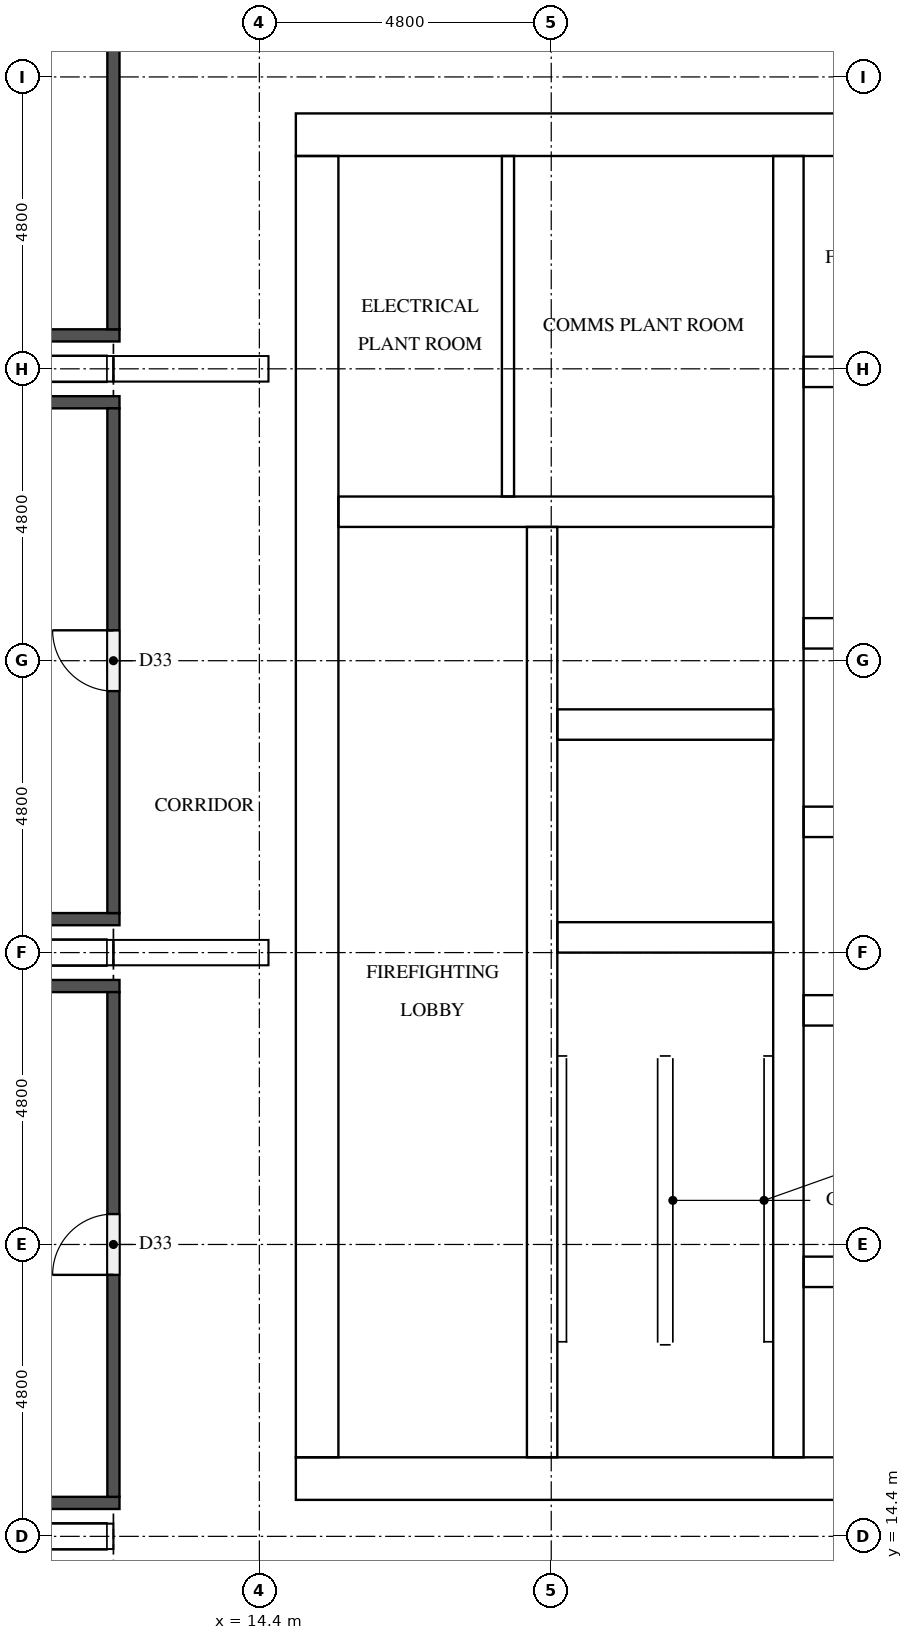
"""IFC4 building model, lengths in metres.
Left out: names, types, materials, properties, quantities, classifications, styles, units other than length and angle.
Written with IfcOpenShell. Run it as: python <this file> out.ifc"""

import sys

from ifc_helpers import new_model, si_unit, direction, frame, frame_2d, origin, place, context, subcontext, project, spatial, rectangle, extrude, element, fill, save


model = new_model("IFC4")
c1 = context("Model", 3, precision=1e-05, world=origin(), true_north=direction((0.0, 1.0)))
c2 = subcontext(c1, "Body", "Model", "MODEL_VIEW")
j1 = project(units=[si_unit("LENGTHUNIT", "METRE"), si_unit("PLANEANGLEUNIT", "RADIAN")], contexts=[c1])
p1 = place(None, origin())
s1 = spatial("IfcSite", under=j1, at=p1, CompositionType="ELEMENT")
p2 = place(p1, origin())
s2 = spatial("IfcBuilding", under=s1, at=p2, CompositionType="ELEMENT")
p3 = place(p2, frame((0.0, 0.0, 173.5)))
s3 = spatial("IfcBuildingStorey", under=s2, at=p3, CompositionType="ELEMENT", Elevation=173.5)
p4 = place(p3, frame((15.0, 15.35, 0.0), z_axis=(0.0, 0.0, 1.0), x_axis=(1.0, 0.0, 0.0)))
e1 = element("IfcWall", 1, at=p4, inside=s3, PredefinedType="SHEAR", context=c2, shape_type="SweptSolid", body=[
    extrude(rectangle(XDim=32.4, YDim=0.7, at=frame_2d((16.2, 0.0))), origin(), (0.0, 0.0, 1.0), 5.1),
])
p5 = place(p4, frame((15.3, 0.0, 0.0)))
e2 = element("IfcOpeningElement", 2, at=p5, cuts=e1, PredefinedType="OPENING", context=c2, shape_type="SweptSolid", body=[
    extrude(rectangle(XDim=1.8, YDim=2.1, at=frame_2d((0.9, 1.05))), frame((0.0, 0.36, 0.0), z_axis=(0.0, -1.0, 0.0), x_axis=(1.0, 0.0, 0.0)), (0.0, 0.0, 1.0), 0.72),
])
p6 = place(p3, frame((15.0, 37.45, 0.0), z_axis=(0.0, 0.0, 1.0), x_axis=(1.0, 0.0, 0.0)))
e3 = element("IfcWall", 3, at=p6, inside=s3, PredefinedType="SHEAR", context=c2, shape_type="SweptSolid", body=[
    extrude(rectangle(XDim=32.4, YDim=0.7, at=frame_2d((16.2, 0.0))), origin(), (0.0, 0.0, 1.0), 5.1),
])
p7 = place(p6, frame((15.3, 0.0, 0.0)))
e4 = element("IfcOpeningElement", 4, at=p7, cuts=e3, PredefinedType="OPENING", context=c2, shape_type="SweptSolid", body=[
    extrude(rectangle(XDim=1.8, YDim=2.1, at=frame_2d((0.9, 1.05))), frame((0.0, 0.36, 0.0), z_axis=(0.0, -1.0, 0.0), x_axis=(1.0, 0.0, 0.0)), (0.0, 0.0, 1.0), 0.72),
])
p8 = place(p6, frame((1.544, 0.0, 0.0)))
e5 = element("IfcOpeningElement", 5, at=p8, cuts=e3, PredefinedType="OPENING", context=c2, shape_type="SweptSolid", body=[
    extrude(rectangle(XDim=1.0, YDim=2.1, at=frame_2d((0.5, 1.05))), frame((0.0, 0.36, 0.0), z_axis=(0.0, -1.0, 0.0), x_axis=(1.0, 0.0, 0.0)), (0.0, 0.0, 1.0), 0.72),
])
p9 = place(p6, frame((5.219, 0.0, 0.0)))
e6 = element("IfcOpeningElement", 6, at=p9, cuts=e3, PredefinedType="OPENING", context=c2, shape_type="SweptSolid", body=[
    extrude(rectangle(XDim=1.0, YDim=2.1, at=frame_2d((0.5, 1.05))), frame((0.0, 0.36, 0.0), z_axis=(0.0, -1.0, 0.0), x_axis=(1.0, 0.0, 0.0)), (0.0, 0.0, 1.0), 0.72),
])
p10 = place(p3, frame((15.35, 15.7, 0.0), z_axis=(0.0, 0.0, 1.0), x_axis=(0.0, 1.0, 0.0)))
e7 = element("IfcWall", 7, at=p10, inside=s3, PredefinedType="SHEAR", context=c2, shape_type="SweptSolid", body=[
    extrude(rectangle(XDim=21.4, YDim=0.7, at=frame_2d((10.7, 0.0))), origin(), (0.0, 0.0, 1.0), 5.1),
])
p11 = place(p10, frame((5.06, 0.0, 0.0)))
e8 = element("IfcOpeningElement", 8, at=p11, cuts=e7, PredefinedType="OPENING", context=c2, shape_type="SweptSolid", body=[
    extrude(rectangle(XDim=1.2, YDim=2.1, at=frame_2d((0.6, 1.05))), frame((0.0, 0.36, 0.0), z_axis=(0.0, -1.0, 0.0), x_axis=(1.0, 0.0, 0.0)), (0.0, 0.0, 1.0), 0.72),
])
p12 = place(p3, frame((19.05, 15.7, 0.0), z_axis=(0.0, 0.0, 1.0), x_axis=(0.0, 1.0, 0.0)))
e9 = element("IfcWall", 9, at=p12, inside=s3, PredefinedType="SHEAR", context=c2, shape_type="SweptSolid", body=[
    extrude(rectangle(XDim=15.3, YDim=0.5, at=frame_2d((7.65, 0.0))), origin(), (0.0, 0.0, 1.0), 5.1),
])
p13 = place(p12, frame((9.75, 0.0, 0.0)))
e10 = element("IfcOpeningElement", 10, at=p13, cuts=e9, PredefinedType="OPENING", context=c2, shape_type="SweptSolid", body=[
    extrude(rectangle(XDim=1.1, YDim=2.1, at=frame_2d((0.55, 1.05))), frame((0.0, 0.26, 0.0), z_axis=(0.0, -1.0, 0.0), x_axis=(1.0, 0.0, 0.0)), (0.0, 0.0, 1.0), 0.52),
])
p14 = place(p12, frame((13.25, 0.0, 0.0)))
e11 = element("IfcOpeningElement", 11, at=p14, cuts=e9, PredefinedType="OPENING", context=c2, shape_type="SweptSolid", body=[
    extrude(rectangle(XDim=1.1, YDim=2.1, at=frame_2d((0.55, 1.05))), frame((0.0, 0.26, 0.0), z_axis=(0.0, -1.0, 0.0), x_axis=(1.0, 0.0, 0.0)), (0.0, 0.0, 1.0), 0.52),
])
p15 = place(p12, frame((0.5, 0.0, 0.0)))
e12 = element("IfcOpeningElement", 12, at=p15, cuts=e9, PredefinedType="OPENING", context=c2, shape_type="SweptSolid", body=[
    extrude(rectangle(XDim=1.2, YDim=2.1, at=frame_2d((0.6, 1.05))), frame((0.0, 0.26, 0.0), z_axis=(0.0, -1.0, 0.0), x_axis=(1.0, 0.0, 0.0)), (0.0, 0.0, 1.0), 0.52),
])
p16 = place(p3, frame((23.1, 15.7, 0.0), z_axis=(0.0, 0.0, 1.0), x_axis=(0.0, 1.0, 0.0)))
e13 = element("IfcWall", 13, at=p16, inside=s3, PredefinedType="SHEAR", context=c2, shape_type="SweptSolid", body=[
    extrude(rectangle(XDim=21.4, YDim=0.5, at=frame_2d((10.7, 0.0))), origin(), (0.0, 0.0, 1.0), 5.1),
])
for number, where, z_axis, x_axis in (
    (14, (19.3, 24.25, 0.0), (0.0, 0.0, 1.0), (1.0, 0.0, 0.0)),
    (15, (19.3, 27.75, 0.0), (0.0, 0.0, 1.0), (1.0, 0.0, 0.0)),
):
    element("IfcWall", number, at=place(p3, frame(where, z_axis=z_axis, x_axis=x_axis)), inside=s3, PredefinedType="SHEAR", context=c2, shape_type="SweptSolid", body=[
        extrude(rectangle(XDim=3.55, YDim=0.5, at=frame_2d((1.775, 0.0))), origin(), (0.0, 0.0, 1.0), 5.1),
    ])
p17 = place(p3, frame((15.7, 31.25, 0.0), z_axis=(0.0, 0.0, 1.0), x_axis=(1.0, 0.0, 0.0)))
e16 = element("IfcWall", 16, at=p17, inside=s3, PredefinedType="SHEAR", context=c2, shape_type="SweptSolid", body=[
    extrude(rectangle(XDim=7.15, YDim=0.5, at=frame_2d((3.575, 0.0))), origin(), (0.0, 0.0, 1.0), 5.1),
])
p18 = place(p3, frame((23.35, 18.75, 0.0), z_axis=(0.0, 0.0, 1.0), x_axis=(1.0, 0.0, 0.0)))
e17 = element("IfcWall", 17, at=p18, inside=s3, PredefinedType="SHEAR", context=c2, shape_type="SweptSolid", body=[
    extrude(rectangle(XDim=5.6, YDim=0.5, at=frame_2d((2.8, 0.0))), origin(), (0.0, 0.0, 1.0), 5.1),
])
p19 = place(p18, frame((2.05, 0.0, 0.0)))
e18 = element("IfcOpeningElement", 18, at=p19, cuts=e17, PredefinedType="OPENING", context=c2, shape_type="SweptSolid", body=[
    extrude(rectangle(XDim=1.0, YDim=2.1, at=frame_2d((0.5, 1.05))), frame((0.0, 0.26, 0.0), z_axis=(0.0, -1.0, 0.0), x_axis=(1.0, 0.0, 0.0)), (0.0, 0.0, 1.0), 0.52),
])
p20 = place(p3, frame((23.35, 23.05, 0.0), z_axis=(0.0, 0.0, 1.0), x_axis=(1.0, 0.0, 0.0)))
e19 = element("IfcWall", 19, at=p20, inside=s3, PredefinedType="SHEAR", context=c2, shape_type="SweptSolid", body=[
    extrude(rectangle(XDim=15.7, YDim=0.5, at=frame_2d((7.85, 0.0))), origin(), (0.0, 0.0, 1.0), 5.1),
])
p21 = place(p20, frame((2.05, 0.0, 0.0)))
e20 = element("IfcOpeningElement", 20, at=p21, cuts=e19, PredefinedType="OPENING", context=c2, shape_type="SweptSolid", body=[
    extrude(rectangle(XDim=1.0, YDim=2.1, at=frame_2d((0.5, 1.05))), frame((0.0, 0.26, 0.0), z_axis=(0.0, -1.0, 0.0), x_axis=(1.0, 0.0, 0.0)), (0.0, 0.0, 1.0), 0.52),
])
p22 = place(p20, frame((12.65, 0.0, 0.0)))
e21 = element("IfcOpeningElement", 21, at=p22, cuts=e19, PredefinedType="OPENING", context=c2, shape_type="SweptSolid", body=[
    extrude(rectangle(XDim=1.0, YDim=2.1, at=frame_2d((0.5, 1.05))), frame((0.0, 0.26, 0.0), z_axis=(0.0, -1.0, 0.0), x_axis=(1.0, 0.0, 0.0)), (0.0, 0.0, 1.0), 0.52),
])
p23 = place(p3, frame((23.35, 26.15, 0.0), z_axis=(0.0, 0.0, 1.0), x_axis=(1.0, 0.0, 0.0)))
e22 = element("IfcWall", 22, at=p23, inside=s3, PredefinedType="SHEAR", context=c2, shape_type="SweptSolid", body=[
    extrude(rectangle(XDim=15.7, YDim=0.5, at=frame_2d((7.85, 0.0))), origin(), (0.0, 0.0, 1.0), 5.1),
])
p24 = place(p3, frame((23.35, 29.25, 0.0), z_axis=(0.0, 0.0, 1.0), x_axis=(1.0, 0.0, 0.0)))
e23 = element("IfcWall", 23, at=p24, inside=s3, PredefinedType="SHEAR", context=c2, shape_type="SweptSolid", body=[
    extrude(rectangle(XDim=15.7, YDim=0.5, at=frame_2d((7.85, 0.0))), origin(), (0.0, 0.0, 1.0), 5.1),
])
p25 = place(p24, frame((0.675, 0.0, 0.0)))
e24 = element("IfcOpeningElement", 24, at=p25, cuts=e23, PredefinedType="OPENING", context=c2, shape_type="SweptSolid", body=[
    extrude(rectangle(XDim=1.1, YDim=2.1, at=frame_2d((0.55, 1.05))), frame((0.0, 0.26, 0.0), z_axis=(0.0, -1.0, 0.0), x_axis=(1.0, 0.0, 0.0)), (0.0, 0.0, 1.0), 0.52),
])
p26 = place(p24, frame((3.325, 0.0, 0.0)))
e25 = element("IfcOpeningElement", 25, at=p26, cuts=e23, PredefinedType="OPENING", context=c2, shape_type="SweptSolid", body=[
    extrude(rectangle(XDim=1.1, YDim=2.1, at=frame_2d((0.55, 1.05))), frame((0.0, 0.26, 0.0), z_axis=(0.0, -1.0, 0.0), x_axis=(1.0, 0.0, 0.0)), (0.0, 0.0, 1.0), 0.52),
])
p27 = place(p24, frame((5.975, 0.0, 0.0)))
e26 = element("IfcOpeningElement", 26, at=p27, cuts=e23, PredefinedType="OPENING", context=c2, shape_type="SweptSolid", body=[
    extrude(rectangle(XDim=1.1, YDim=2.1, at=frame_2d((0.55, 1.05))), frame((0.0, 0.26, 0.0), z_axis=(0.0, -1.0, 0.0), x_axis=(1.0, 0.0, 0.0)), (0.0, 0.0, 1.0), 0.52),
])
p28 = place(p24, frame((8.625, 0.0, 0.0)))
e27 = element("IfcOpeningElement", 27, at=p28, cuts=e23, PredefinedType="OPENING", context=c2, shape_type="SweptSolid", body=[
    extrude(rectangle(XDim=1.1, YDim=2.1, at=frame_2d((0.55, 1.05))), frame((0.0, 0.26, 0.0), z_axis=(0.0, -1.0, 0.0), x_axis=(1.0, 0.0, 0.0)), (0.0, 0.0, 1.0), 0.52),
])
p29 = place(p24, frame((11.275, 0.0, 0.0)))
e28 = element("IfcOpeningElement", 28, at=p29, cuts=e23, PredefinedType="OPENING", context=c2, shape_type="SweptSolid", body=[
    extrude(rectangle(XDim=1.1, YDim=2.1, at=frame_2d((0.55, 1.05))), frame((0.0, 0.26, 0.0), z_axis=(0.0, -1.0, 0.0), x_axis=(1.0, 0.0, 0.0)), (0.0, 0.0, 1.0), 0.52),
])
p30 = place(p24, frame((13.925, 0.0, 0.0)))
e29 = element("IfcOpeningElement", 29, at=p30, cuts=e23, PredefinedType="OPENING", context=c2, shape_type="SweptSolid", body=[
    extrude(rectangle(XDim=1.1, YDim=2.1, at=frame_2d((0.55, 1.05))), frame((0.0, 0.26, 0.0), z_axis=(0.0, -1.0, 0.0), x_axis=(1.0, 0.0, 0.0)), (0.0, 0.0, 1.0), 0.52),
])
p31 = place(p3, frame((23.35, 33.55, 0.0), z_axis=(0.0, 0.0, 1.0), x_axis=(1.0, 0.0, 0.0)))
e30 = element("IfcWall", 30, at=p31, inside=s3, PredefinedType="SHEAR", context=c2, shape_type="SweptSolid", body=[
    extrude(rectangle(XDim=5.6, YDim=0.5, at=frame_2d((2.8, 0.0))), origin(), (0.0, 0.0, 1.0), 5.1),
])
p32 = place(p31, frame((2.05, 0.0, 0.0)))
e31 = element("IfcOpeningElement", 31, at=p32, cuts=e30, PredefinedType="OPENING", context=c2, shape_type="SweptSolid", body=[
    extrude(rectangle(XDim=1.0, YDim=2.1, at=frame_2d((0.5, 1.05))), frame((0.0, 0.26, 0.0), z_axis=(0.0, -1.0, 0.0), x_axis=(1.0, 0.0, 0.0)), (0.0, 0.0, 1.0), 0.52),
])
p33 = place(p3, frame((18.489, 31.5, 0.0), z_axis=(0.0, 0.0, 1.0), x_axis=(0.0, 1.0, 0.0)))
e32 = element("IfcWall", 32, at=p33, inside=s3, PredefinedType="PARTITIONING", context=c2, shape_type="SweptSolid", body=[
    extrude(rectangle(XDim=5.6, YDim=0.2, at=frame_2d((2.8, 0.0))), origin(), (0.0, 0.0, 1.0), 5.1),
])
for number, where, z_axis, x_axis in (
    (33, (7.1, 14.95, 0.0), (0.0, 0.0, 1.0), (1.0, 0.0, 0.0)),
    (34, (7.1, 23.45, 0.0), (0.0, 0.0, 1.0), (1.0, 0.0, 0.0)),
    (35, (7.1, 24.55, 0.0), (0.0, 0.0, 1.0), (1.0, 0.0, 0.0)),
    (36, (7.1, 33.05, 0.0), (0.0, 0.0, 1.0), (1.0, 0.0, 0.0)),
    (37, (7.1, 34.15, 0.0), (0.0, 0.0, 1.0), (1.0, 0.0, 0.0)),
):
    element("IfcWall", number, at=place(p3, frame(where, z_axis=z_axis, x_axis=x_axis)), inside=s3, PredefinedType="PARTITIONING", context=c2, shape_type="SweptSolid", body=[
        extrude(rectangle(XDim=5.0, YDim=0.2, at=frame_2d((2.5, 0.0))), origin(), (0.0, 0.0, 1.0), 5.1),
    ])
p34 = place(p3, frame((12.0, 15.05, 0.0), z_axis=(0.0, 0.0, 1.0), x_axis=(0.0, 1.0, 0.0)))
e38 = element("IfcWall", 38, at=p34, inside=s3, PredefinedType="PARTITIONING", context=c2, shape_type="SweptSolid", body=[
    extrude(rectangle(XDim=8.3, YDim=0.2, at=frame_2d((4.15, 0.0))), origin(), (0.0, 0.0, 1.0), 5.1),
])
p35 = place(p34, frame((3.65, 0.0, 0.0)))
e39 = element("IfcOpeningElement", 39, at=p35, cuts=e38, PredefinedType="OPENING", context=c2, shape_type="SweptSolid", body=[
    extrude(rectangle(XDim=1.0, YDim=2.1, at=frame_2d((0.5, 1.05))), frame((0.0, 0.11, 0.0), z_axis=(0.0, -1.0, 0.0), x_axis=(1.0, 0.0, 0.0)), (0.0, 0.0, 1.0), 0.22),
])
p36 = place(p3, frame((12.0, 24.65, 0.0), z_axis=(0.0, 0.0, 1.0), x_axis=(0.0, 1.0, 0.0)))
e40 = element("IfcWall", 40, at=p36, inside=s3, PredefinedType="PARTITIONING", context=c2, shape_type="SweptSolid", body=[
    extrude(rectangle(XDim=8.3, YDim=0.2, at=frame_2d((4.15, 0.0))), origin(), (0.0, 0.0, 1.0), 5.1),
])
p37 = place(p36, frame((3.65, 0.0, 0.0)))
e41 = element("IfcOpeningElement", 41, at=p37, cuts=e40, PredefinedType="OPENING", context=c2, shape_type="SweptSolid", body=[
    extrude(rectangle(XDim=1.0, YDim=2.1, at=frame_2d((0.5, 1.05))), frame((0.0, 0.11, 0.0), z_axis=(0.0, -1.0, 0.0), x_axis=(1.0, 0.0, 0.0)), (0.0, 0.0, 1.0), 0.22),
])
p38 = place(p3, frame((12.0, 34.25, 0.0), z_axis=(0.0, 0.0, 1.0), x_axis=(0.0, 1.0, 0.0)))
e42 = element("IfcWall", 42, at=p38, inside=s3, PredefinedType="PARTITIONING", context=c2, shape_type="SweptSolid", body=[
    extrude(rectangle(XDim=6.45, YDim=0.2, at=frame_2d((3.225, 0.0))), origin(), (0.0, 0.0, 1.0), 5.1),
])
p39 = place(p13, origin())
e43 = element("IfcDoor", 43, at=p39, inside=s3, OperationType="DOUBLE_DOOR_SLIDING", PredefinedType="DOOR", context=c2, shape_type="SweptSolid", body=[
    extrude(rectangle(XDim=1.1, YDim=2.1, at=frame_2d((0.55, 1.05))), frame((0.0, 0.025, 0.0), z_axis=(0.0, -1.0, 0.0), x_axis=(1.0, 0.0, 0.0)), (0.0, 0.0, 1.0), 0.05),
])
fill(e10, e43)
p40 = place(p14, origin())
e44 = element("IfcDoor", 44, at=p40, inside=s3, OperationType="DOUBLE_DOOR_SLIDING", PredefinedType="DOOR", context=c2, shape_type="SweptSolid", body=[
    extrude(rectangle(XDim=1.1, YDim=2.1, at=frame_2d((0.55, 1.05))), frame((0.0, 0.025, 0.0), z_axis=(0.0, -1.0, 0.0), x_axis=(1.0, 0.0, 0.0)), (0.0, 0.0, 1.0), 0.05),
])
fill(e11, e44)
p41 = place(p15, frame((1.2, 0.0, 0.0), z_axis=(0.0, 0.0, 1.0), x_axis=(-1.0, 0.0, 0.0)))
e45 = element("IfcDoor", 45, at=p41, inside=s3, OperationType="SINGLE_SWING_LEFT", PredefinedType="DOOR", context=c2, shape_type="SweptSolid", body=[
    extrude(rectangle(XDim=1.2, YDim=2.1, at=frame_2d((0.6, 1.05))), frame((0.0, 0.025, 0.0), z_axis=(0.0, -1.0, 0.0), x_axis=(1.0, 0.0, 0.0)), (0.0, 0.0, 1.0), 0.05),
])
fill(e12, e45)
p42 = place(p11, frame((1.2, 0.0, 0.0), z_axis=(0.0, 0.0, 1.0), x_axis=(-1.0, 0.0, 0.0)))
e46 = element("IfcDoor", 46, at=p42, inside=s3, OperationType="SINGLE_SWING_RIGHT", PredefinedType="DOOR", context=c2, shape_type="SweptSolid", body=[
    extrude(rectangle(XDim=1.2, YDim=2.1, at=frame_2d((0.6, 1.05))), frame((0.0, 0.025, 0.0), z_axis=(0.0, -1.0, 0.0), x_axis=(1.0, 0.0, 0.0)), (0.0, 0.0, 1.0), 0.05),
])
fill(e8, e46)
p43 = place(p8, origin())
e47 = element("IfcDoor", 47, at=p43, inside=s3, OperationType="SINGLE_SWING_RIGHT", PredefinedType="DOOR", context=c2, shape_type="SweptSolid", body=[
    extrude(rectangle(XDim=1.0, YDim=2.1, at=frame_2d((0.5, 1.05))), frame((0.0, 0.025, 0.0), z_axis=(0.0, -1.0, 0.0), x_axis=(1.0, 0.0, 0.0)), (0.0, 0.0, 1.0), 0.05),
])
fill(e5, e47)
p44 = place(p9, origin())
e48 = element("IfcDoor", 48, at=p44, inside=s3, OperationType="SINGLE_SWING_LEFT", PredefinedType="DOOR", context=c2, shape_type="SweptSolid", body=[
    extrude(rectangle(XDim=1.0, YDim=2.1, at=frame_2d((0.5, 1.05))), frame((0.0, 0.025, 0.0), z_axis=(0.0, -1.0, 0.0), x_axis=(1.0, 0.0, 0.0)), (0.0, 0.0, 1.0), 0.05),
])
fill(e6, e48)
p45 = place(p35, origin())
e49 = element("IfcDoor", 49, at=p45, inside=s3, OperationType="SINGLE_SWING_LEFT", PredefinedType="DOOR", context=c2, shape_type="SweptSolid", body=[
    extrude(rectangle(XDim=1.0, YDim=2.1, at=frame_2d((0.5, 1.05))), frame((0.0, 0.025, 0.0), z_axis=(0.0, -1.0, 0.0), x_axis=(1.0, 0.0, 0.0)), (0.0, 0.0, 1.0), 0.05),
])
fill(e39, e49)
p46 = place(p37, origin())
e50 = element("IfcDoor", 50, at=p46, inside=s3, OperationType="SINGLE_SWING_RIGHT", PredefinedType="DOOR", context=c2, shape_type="SweptSolid", body=[
    extrude(rectangle(XDim=1.0, YDim=2.1, at=frame_2d((0.5, 1.05))), frame((0.0, 0.025, 0.0), z_axis=(0.0, -1.0, 0.0), x_axis=(1.0, 0.0, 0.0)), (0.0, 0.0, 1.0), 0.05),
])
fill(e41, e50)
save(model, sys.argv[1])
